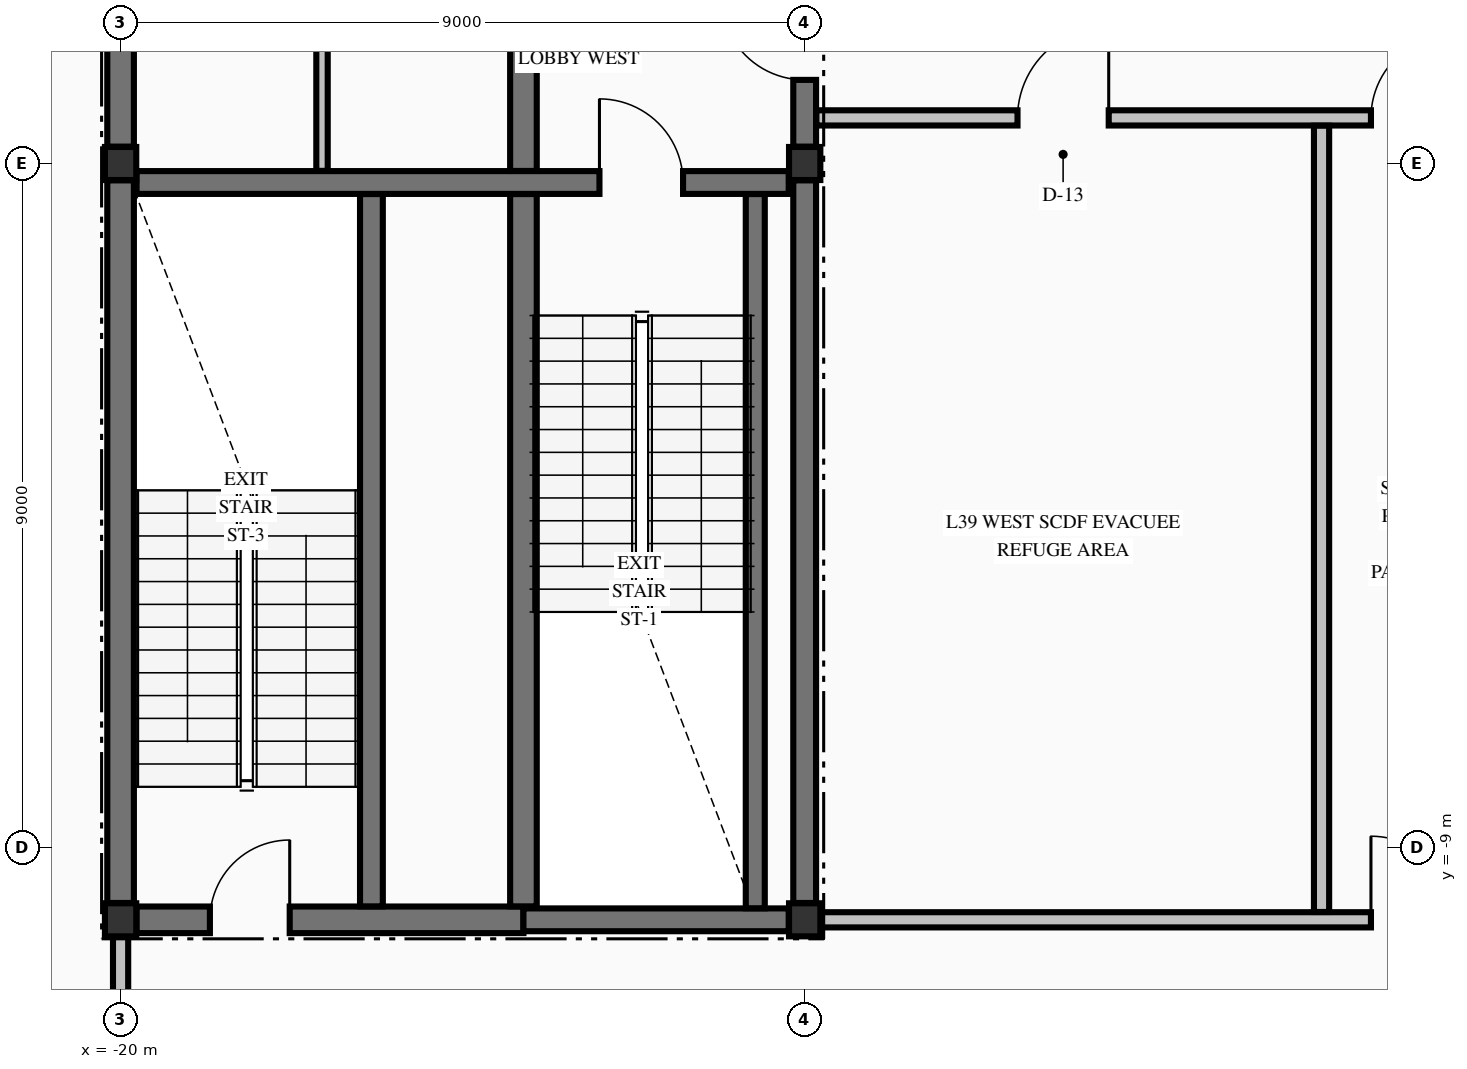
"""IFC4 building model, lengths in metres.
Left out: names, types, materials, properties, quantities, classifications, styles, units other than length and angle.
Written with IfcOpenShell. Run it as: python <this file> out.ifc"""

import sys

from ifc_helpers import new_model, si_unit, direction, frame, frame_2d, origin, origin_2d, place, context, subcontext, project, spatial, rectangle, i_section, extrude, element, fill, save


model = new_model("IFC4")
c1 = context("Model", 3, precision=1e-05, world=origin(), true_north=direction((0.0, 1.0)))
c2 = subcontext(c1, "Body", "Model", "MODEL_VIEW")
j1 = project(units=[si_unit("LENGTHUNIT", "METRE"), si_unit("PLANEANGLEUNIT", "RADIAN")], contexts=[c1])
p1 = place(None, origin())
s1 = spatial("IfcSite", under=j1, at=p1, CompositionType="ELEMENT")
p2 = place(p1, origin())
s2 = spatial("IfcBuilding", under=s1, at=p2, CompositionType="ELEMENT")
p3 = place(p2, frame((0.0, 0.0, 153.48)))
s3 = spatial("IfcBuildingStorey", under=s2, at=p3, CompositionType="ELEMENT", Elevation=153.48)
for number, where, z_axis, x_axis in (
    (1, (-20.0, -9.95, -0.425), (0.0, 0.0, 1.0), (1.0, 0.0, 0.0)),
    (2, (-11.0, -9.95, -0.425), (0.0, 0.0, 1.0), (1.0, 0.0, 0.0)),
    (3, (-11.0, 0.0, -0.425), (0.0, 0.0, 1.0), (1.0, 0.0, 0.0)),
    (4, (-20.0, 0.0, -0.425), (0.0, 0.0, 1.0), (1.0, 0.0, 0.0)),
):
    element("IfcColumn", number, at=place(p3, frame(where, z_axis=z_axis, x_axis=x_axis)), inside=s3, PredefinedType="COLUMN", context=c2, shape_type="SweptSolid", body=[
        extrude(i_section(OverallWidth=0.412, OverallDepth=0.435, WebThickness=0.036, FlangeThickness=0.058, FilletRadius=0.015, at=origin_2d()), origin(), (0.0, 0.0, 1.0), 4.76),
    ])
p4 = place(p3, frame((-19.79, -9.95, 0.0), z_axis=(0.0, 0.0, 1.0), x_axis=(1.0, 0.0, 0.0)))
e5 = element("IfcWall", 5, at=p4, inside=s3, PredefinedType="SHEAR", context=c2, shape_type="SweptSolid", body=[
    extrude(rectangle(XDim=5.09, YDim=0.35, at=frame_2d((2.545, 0.0))), origin(), (0.0, 0.0, 1.0), 4.335),
])
p5 = place(p4, frame((0.965, 0.0, 0.0)))
e6 = element("IfcOpeningElement", 6, at=p5, cuts=e5, PredefinedType="OPENING", context=c2, shape_type="SweptSolid", body=[
    extrude(rectangle(XDim=1.05, YDim=2.15, at=frame_2d((0.525, 1.075))), frame((0.0, 0.185, 0.0), z_axis=(0.0, -1.0, 0.0), x_axis=(1.0, 0.0, 0.0)), (0.0, 0.0, 1.0), 0.37),
])
p6 = place(p3, frame((-14.7, -9.95, 0.0), z_axis=(0.0, 0.0, 1.0), x_axis=(1.0, 0.0, 0.0)))
e7 = element("IfcWall", 7, at=p6, inside=s3, PredefinedType="SHEAR", context=c2, shape_type="SweptSolid", body=[
    extrude(rectangle(XDim=3.49, YDim=0.3, at=frame_2d((1.745, 0.0))), origin(), (0.0, 0.0, 1.0), 4.335),
])
p7 = place(p3, frame((-19.79, -0.25, 0.0), z_axis=(0.0, 0.0, 1.0), x_axis=(1.0, 0.0, 0.0)))
e8 = element("IfcWall", 8, at=p7, inside=s3, PredefinedType="SHEAR", context=c2, shape_type="SweptSolid", body=[
    extrude(rectangle(XDim=8.58, YDim=0.3, at=frame_2d((4.29, 0.0))), origin(), (0.0, 0.0, 1.0), 4.335),
])
p8 = place(p7, frame((6.09, 0.0, 0.0)))
e9 = element("IfcOpeningElement", 9, at=p8, cuts=e8, PredefinedType="OPENING", context=c2, shape_type="SweptSolid", body=[
    extrude(rectangle(XDim=1.1, YDim=2.15, at=frame_2d((0.55, 1.075))), frame((0.0, 0.16, 0.0), z_axis=(0.0, -1.0, 0.0), x_axis=(1.0, 0.0, 0.0)), (0.0, 0.0, 1.0), 0.32),
])
p9 = place(p3, frame((-10.788, -9.95, 0.0), z_axis=(0.0, 0.0, 1.0), x_axis=(1.0, 0.0, 0.0)))
e10 = element("IfcWall", 10, at=p9, inside=s3, PredefinedType="PARTITIONING", context=c2, shape_type="SweptSolid", body=[
    extrude(rectangle(XDim=21.576, YDim=0.2, at=frame_2d((10.788, 0.0))), origin(), (0.0, 0.0, 1.0), 4.335),
])
p10 = place(p9, frame((7.238, 0.0, 0.0)))
e11 = element("IfcOpeningElement", 11, at=p10, cuts=e10, PredefinedType="OPENING", context=c2, shape_type="SweptSolid", body=[
    extrude(rectangle(XDim=1.1, YDim=2.15, at=frame_2d((0.55, 1.075))), frame((0.0, 0.11, 0.0), z_axis=(0.0, -1.0, 0.0), x_axis=(1.0, 0.0, 0.0)), (0.0, 0.0, 1.0), 0.22),
])
p11 = place(p3, frame((-10.847, 0.6, 0.0), z_axis=(0.0, 0.0, 1.0), x_axis=(1.0, 0.0, 0.0)))
e12 = element("IfcWall", 12, at=p11, inside=s3, PredefinedType="PARTITIONING", context=c2, shape_type="SweptSolid", body=[
    extrude(rectangle(XDim=21.694, YDim=0.2, at=frame_2d((10.847, 0.0))), origin(), (0.0, 0.0, 1.0), 4.335),
])
p12 = place(p11, frame((7.297, 0.0, 0.0)))
e13 = element("IfcOpeningElement", 13, at=p12, cuts=e12, PredefinedType="OPENING", context=c2, shape_type="SweptSolid", body=[
    extrude(rectangle(XDim=1.1, YDim=2.15, at=frame_2d((0.55, 1.075))), frame((0.0, 0.11, 0.0), z_axis=(0.0, -1.0, 0.0), x_axis=(1.0, 0.0, 0.0)), (0.0, 0.0, 1.0), 0.22),
])
p13 = place(p11, frame((2.647, 0.0, 0.0)))
e14 = element("IfcOpeningElement", 14, at=p13, cuts=e12, PredefinedType="OPENING", context=c2, shape_type="SweptSolid", body=[
    extrude(rectangle(XDim=1.2, YDim=2.15, at=frame_2d((0.6, 1.075))), frame((0.0, 0.11, 0.0), z_axis=(0.0, -1.0, 0.0), x_axis=(1.0, 0.0, 0.0)), (0.0, 0.0, 1.0), 0.22),
])
p14 = place(p11, frame((14.847, 0.0, 0.0)))
e15 = element("IfcOpeningElement", 15, at=p14, cuts=e12, PredefinedType="OPENING", context=c2, shape_type="SweptSolid", body=[
    extrude(rectangle(XDim=1.2, YDim=2.15, at=frame_2d((0.6, 1.075))), frame((0.0, 0.11, 0.0), z_axis=(0.0, -1.0, 0.0), x_axis=(1.0, 0.0, 0.0)), (0.0, 0.0, 1.0), 0.22),
])
p15 = place(p3, frame((-20.0, -9.729, 0.0), z_axis=(0.0, 0.0, 1.0), x_axis=(0.0, 1.0, 0.0)))
e16 = element("IfcWall", 16, at=p15, inside=s3, PredefinedType="SHEAR", context=c2, shape_type="SweptSolid", body=[
    extrude(rectangle(XDim=9.507, YDim=0.35, at=frame_2d((4.753, 0.0))), origin(), (0.0, 0.0, 1.0), 4.335),
])
p16 = place(p3, frame((-20.0, 0.221, 0.0), z_axis=(0.0, 0.0, 1.0), x_axis=(0.0, 1.0, 0.0)))
e17 = element("IfcWall", 17, at=p16, inside=s3, PredefinedType="SHEAR", context=c2, shape_type="SweptSolid", body=[
    extrude(rectangle(XDim=10.057, YDim=0.35, at=frame_2d((5.029, 0.0))), origin(), (0.0, 0.0, 1.0), 4.335),
])
p17 = place(p3, frame((-16.7, -9.773, 0.0), z_axis=(0.0, 0.0, 1.0), x_axis=(0.0, 1.0, 0.0)))
e18 = element("IfcWall", 18, at=p17, inside=s3, PredefinedType="SHEAR", context=c2, shape_type="SweptSolid", body=[
    extrude(rectangle(XDim=9.371, YDim=0.3, at=frame_2d((4.686, 0.0))), origin(), (0.0, 0.0, 1.0), 4.335),
])
p18 = place(p3, frame((-14.7, -9.773, 0.0), z_axis=(0.0, 0.0, 1.0), x_axis=(0.0, 1.0, 0.0)))
e19 = element("IfcWall", 19, at=p18, inside=s3, PredefinedType="SHEAR", context=c2, shape_type="SweptSolid", body=[
    extrude(rectangle(XDim=9.371, YDim=0.35, at=frame_2d((4.686, 0.0))), origin(), (0.0, 0.0, 1.0), 4.335),
])
p19 = place(p3, frame((-14.7, -0.098, 0.0), z_axis=(0.0, 0.0, 1.0), x_axis=(0.0, 1.0, 0.0)))
e20 = element("IfcWall", 20, at=p19, inside=s3, PredefinedType="SHEAR", context=c2, shape_type="SweptSolid", body=[
    extrude(rectangle(XDim=2.846, YDim=0.35, at=frame_2d((1.423, 0.0))), origin(), (0.0, 0.0, 1.0), 4.335),
])
p20 = place(p3, frame((-11.65, -9.798, 0.0), z_axis=(0.0, 0.0, 1.0), x_axis=(0.0, 1.0, 0.0)))
e21 = element("IfcWall", 21, at=p20, inside=s3, PredefinedType="SOLIDWALL", context=c2, shape_type="SweptSolid", body=[
    extrude(rectangle(XDim=9.396, YDim=0.25, at=frame_2d((4.698, 0.0))), origin(), (0.0, 0.0, 1.0), 4.335),
])
p21 = place(p3, frame((-11.0, -9.729, 0.0), z_axis=(0.0, 0.0, 1.0), x_axis=(0.0, 1.0, 0.0)))
e22 = element("IfcWall", 22, at=p21, inside=s3, PredefinedType="SHEAR", context=c2, shape_type="SweptSolid", body=[
    extrude(rectangle(XDim=9.507, YDim=0.3, at=frame_2d((4.753, 0.0))), origin(), (0.0, 0.0, 1.0), 4.335),
])
p22 = place(p3, frame((-11.0, 0.221, 0.0), z_axis=(0.0, 0.0, 1.0), x_axis=(0.0, 1.0, 0.0)))
e23 = element("IfcWall", 23, at=p22, inside=s3, PredefinedType="SHEAR", context=c2, shape_type="SweptSolid", body=[
    extrude(rectangle(XDim=2.527, YDim=0.3, at=frame_2d((1.263, 0.0))), origin(), (0.0, 0.0, 1.0), 4.335),
])
p23 = place(p22, frame((0.878, 0.0, 0.0)))
e24 = element("IfcOpeningElement", 24, at=p23, cuts=e23, PredefinedType="OPENING", context=c2, shape_type="SweptSolid", body=[
    extrude(rectangle(XDim=1.1, YDim=2.15, at=frame_2d((0.55, 1.075))), frame((0.0, 0.16, 0.0), z_axis=(0.0, -1.0, 0.0), x_axis=(1.0, 0.0, 0.0)), (0.0, 0.0, 1.0), 0.32),
])
p24 = place(p3, frame((-20.0, -12.697, 0.0), z_axis=(0.0, 0.0, 1.0), x_axis=(0.0, 1.0, 0.0)))
e25 = element("IfcWall", 25, at=p24, inside=s3, PredefinedType="PARTITIONING", context=c2, shape_type="SweptSolid", body=[
    extrude(rectangle(XDim=2.523, YDim=0.2, at=frame_2d((1.262, 0.0))), origin(), (0.0, 0.0, 1.0), 1.927),
])
p25 = place(p3, frame((-17.35, -0.097, 0.0), z_axis=(0.0, 0.0, 1.0), x_axis=(0.0, 1.0, 0.0)))
e26 = element("IfcWall", 26, at=p25, inside=s3, PredefinedType="PARTITIONING", context=c2, shape_type="SweptSolid", body=[
    extrude(rectangle(XDim=10.419, YDim=0.15, at=frame_2d((5.209, 0.0))), origin(), (0.0, 0.0, 1.0), 4.335),
])
p26 = place(p3, frame((-4.2, -9.847, 0.0), z_axis=(0.0, 0.0, 1.0), x_axis=(0.0, 1.0, 0.0)))
e27 = element("IfcWall", 27, at=p26, inside=s3, PredefinedType="PARTITIONING", context=c2, shape_type="SweptSolid", body=[
    extrude(rectangle(XDim=10.344, YDim=0.2, at=frame_2d((5.172, 0.0))), origin(), (0.0, 0.0, 1.0), 4.335),
])
p27 = place(p8, origin())
e28 = element("IfcDoor", 28, at=p27, inside=s3, OperationType="SINGLE_SWING_LEFT", PredefinedType="DOOR", context=c2, shape_type="SweptSolid", body=[
    extrude(rectangle(XDim=1.1, YDim=2.15, at=frame_2d((0.55, 1.075))), frame((0.0, 0.025, 0.0), z_axis=(0.0, -1.0, 0.0), x_axis=(1.0, 0.0, 0.0)), (0.0, 0.0, 1.0), 0.05),
])
fill(e9, e28)
p28 = place(p23, origin())
e29 = element("IfcDoor", 29, at=p28, inside=s3, OperationType="SINGLE_SWING_RIGHT", PredefinedType="DOOR", context=c2, shape_type="SweptSolid", body=[
    extrude(rectangle(XDim=1.1, YDim=2.15, at=frame_2d((0.55, 1.075))), frame((0.0, 0.025, 0.0), z_axis=(0.0, -1.0, 0.0), x_axis=(1.0, 0.0, 0.0)), (0.0, 0.0, 1.0), 0.05),
])
fill(e24, e29)
p29 = place(p5, origin())
e30 = element("IfcDoor", 30, at=p29, inside=s3, OperationType="SINGLE_SWING_RIGHT", PredefinedType="DOOR", context=c2, shape_type="SweptSolid", body=[
    extrude(rectangle(XDim=1.05, YDim=2.15, at=frame_2d((0.525, 1.075))), frame((0.0, 0.025, 0.0), z_axis=(0.0, -1.0, 0.0), x_axis=(1.0, 0.0, 0.0)), (0.0, 0.0, 1.0), 0.05),
])
fill(e6, e30)
p30 = place(p12, origin())
e31 = element("IfcDoor", 31, at=p30, inside=s3, OperationType="SINGLE_SWING_RIGHT", PredefinedType="DOOR", context=c2, shape_type="SweptSolid", body=[
    extrude(rectangle(XDim=1.1, YDim=2.15, at=frame_2d((0.55, 1.075))), frame((0.0, 0.025, 0.0), z_axis=(0.0, -1.0, 0.0), x_axis=(1.0, 0.0, 0.0)), (0.0, 0.0, 1.0), 0.05),
])
fill(e13, e31)
p31 = place(p10, origin())
e32 = element("IfcDoor", 32, at=p31, inside=s3, OperationType="SINGLE_SWING_LEFT", PredefinedType="DOOR", context=c2, shape_type="SweptSolid", body=[
    extrude(rectangle(XDim=1.1, YDim=2.15, at=frame_2d((0.55, 1.075))), frame((0.0, 0.025, 0.0), z_axis=(0.0, -1.0, 0.0), x_axis=(1.0, 0.0, 0.0)), (0.0, 0.0, 1.0), 0.05),
])
fill(e11, e32)
p32 = place(p13, origin())
e33 = element("IfcDoor", 33, at=p32, inside=s3, OperationType="SINGLE_SWING_RIGHT", PredefinedType="DOOR", context=c2, shape_type="SweptSolid", body=[
    extrude(rectangle(XDim=1.2, YDim=2.15, at=frame_2d((0.6, 1.075))), frame((0.0, 0.025, 0.0), z_axis=(0.0, -1.0, 0.0), x_axis=(1.0, 0.0, 0.0)), (0.0, 0.0, 1.0), 0.05),
])
fill(e14, e33)
save(model, sys.argv[1])
